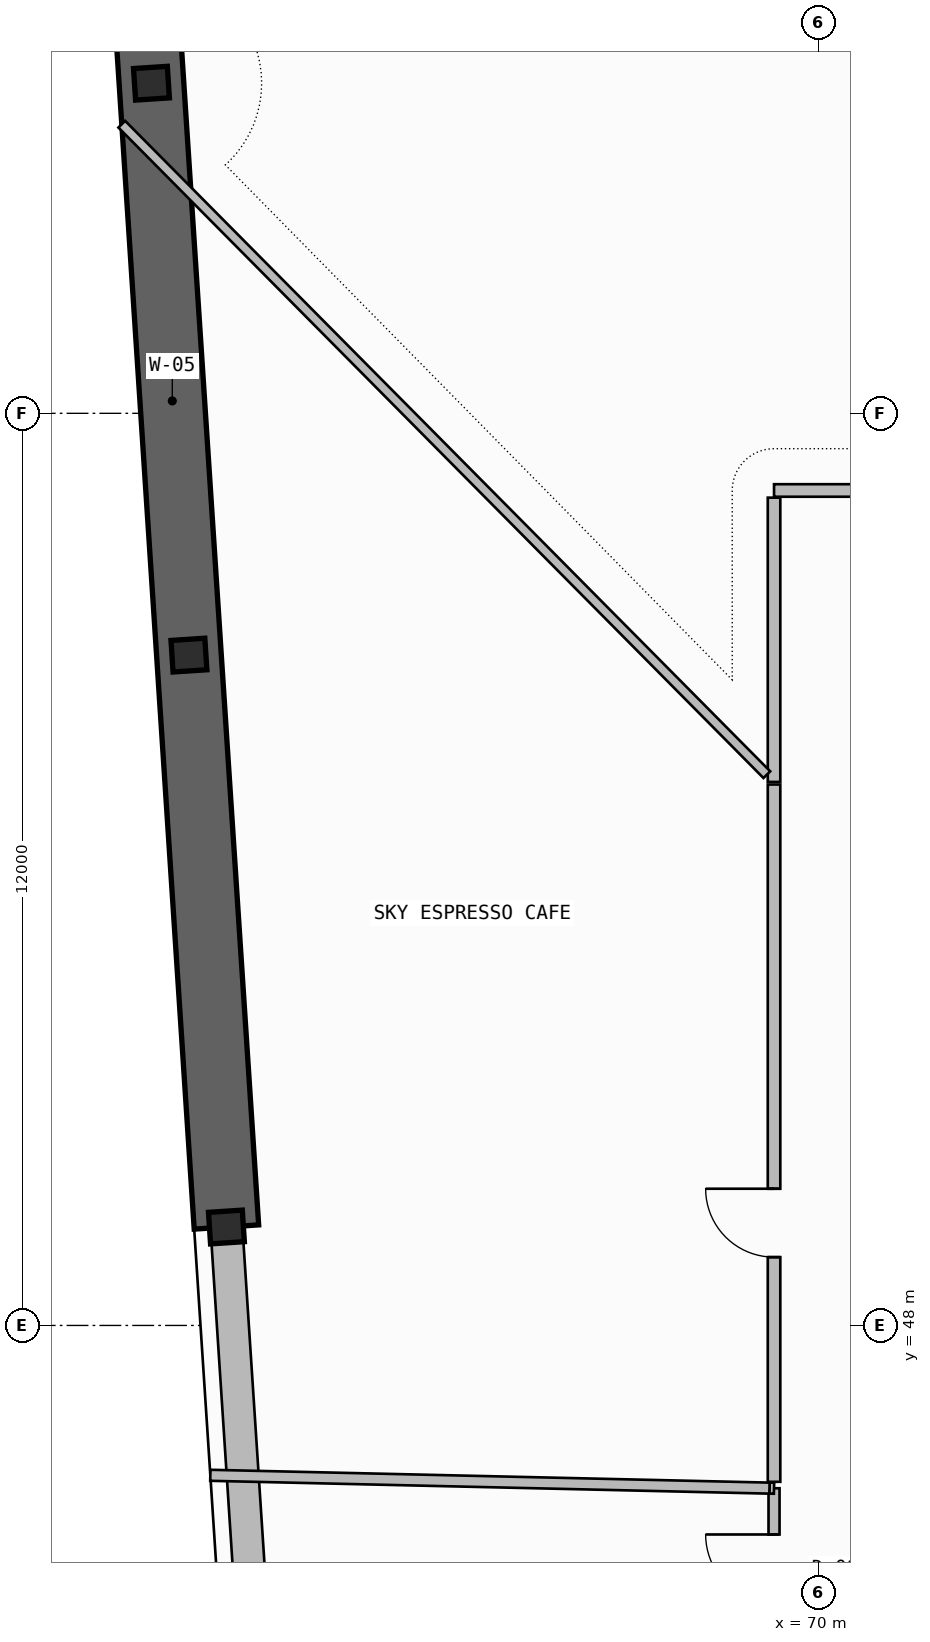
"""IFC4 building model, lengths in metres.
Left out: names, types, materials, properties, quantities, classifications, styles, units other than length and angle.
Written with IfcOpenShell. Run it as: python <this file> out.ifc"""

import sys

from ifc_helpers import new_model, si_unit, direction, frame, frame_2d, origin, origin_2d, place, context, subcontext, project, spatial, rectangle, i_section, extrude, element, fill, save


model = new_model("IFC4")
c1 = context("Model", 3, precision=1e-05, world=origin(), true_north=direction((0.0, 1.0)))
c2 = subcontext(c1, "Body", "Model", "MODEL_VIEW")
j1 = project(units=[si_unit("LENGTHUNIT", "METRE"), si_unit("PLANEANGLEUNIT", "RADIAN")], contexts=[c1])
p1 = place(None, origin())
s1 = spatial("IfcSite", under=j1, at=p1, CompositionType="ELEMENT")
p2 = place(p1, origin())
s2 = spatial("IfcBuilding", under=s1, at=p2, CompositionType="ELEMENT")
p3 = place(p2, frame((0.0, 0.0, 92.1)))
s3 = spatial("IfcBuildingStorey", under=s2, at=p3, CompositionType="ELEMENT", Elevation=92.1)
for number, where, z_axis, x_axis in (
    (1, (61.224, 64.343, 0.0), (0.0, 0.0, 1.0), (-0.065, 0.998, 0.0)),
    (2, (61.717, 56.819, 0.0), (0.0, 0.0, 1.0), (-0.065, 0.998, 0.0)),
    (3, (62.21, 49.295, 0.0), (0.0, 0.0, 1.0), (-0.065, 0.998, 0.0)),
):
    element("IfcColumn", number, at=place(p3, frame(where, z_axis=z_axis, x_axis=x_axis)), inside=s3, PredefinedType="COLUMN", context=c2, shape_type="SweptSolid", body=[
        extrude(i_section(OverallWidth=0.416, OverallDepth=0.446, WebThickness=0.039, FlangeThickness=0.063, FilletRadius=0.015, at=origin_2d()), origin(), (0.0, 0.0, 1.0), 3.6),
    ])
p4 = place(p3, frame((60.785, 71.031, -0.26), z_axis=(0.0, 0.0, 1.0), x_axis=(0.065409824833, -0.997858484363, 0.0)))
e4 = element("IfcWall", 4, at=p4, inside=s3, PredefinedType="SHEAR", context=c2, shape_type="SweptSolid", body=[
    extrude(rectangle(XDim=21.783, YDim=0.85, at=frame_2d((10.891, 0.0))), origin(), (0.0, 0.0, 1.0), 3.46),
])
p5 = place(p3, frame((62.21, 49.295, 0.0), z_axis=(0.0, 0.0, 1.0), x_axis=(0.065396027757, -0.997859388668, 0.0)))
e5 = element("IfcWall", 5, at=p5, inside=s3, PredefinedType="SOLIDWALL", context=c2, shape_type="SweptSolid", body=[
    extrude(rectangle(XDim=14.242, YDim=0.42, at=frame_2d((7.121, 0.0))), origin(), (0.0, 0.0, 1.0), 2.177),
])
p6 = place(p5, frame((7.1, 0.0, 1.197)))
e6 = element("IfcOpeningElement", 6, at=p6, cuts=e5, PredefinedType="OPENING", context=c2, shape_type="SweptSolid", body=[
    extrude(rectangle(XDim=3.0, YDim=0.9, at=frame_2d((1.5, 0.45))), frame((0.0, 0.22, 0.0), z_axis=(0.0, -1.0, 0.0), x_axis=(1.0, 0.0, 0.0)), (0.0, 0.0, 1.0), 0.44),
])
p7 = place(p3, frame((93.176, 59.939, 0.0), z_axis=(0.0, 0.0, 1.0), x_axis=(-0.842412534527, 0.53883311115, 0.0)))
e7 = element("IfcWall", 7, at=p7, inside=s3, PredefinedType="PARAPET", context=c2, shape_type="SweptSolid", body=[
    extrude(rectangle(XDim=35.964, YDim=0.2, at=frame_2d((17.982, 0.0))), origin(), (0.0, 0.0, 1.0), 1.15),
])
p8 = place(p3, frame((69.415, 45.858, 0.0), z_axis=(0.0, 0.0, 1.0), x_axis=(0.0, -1.0, 0.0)))
e8 = element("IfcWall", 8, at=p8, inside=s3, PredefinedType="PARTITIONING", context=c2, shape_type="SweptSolid", body=[
    extrude(rectangle(XDim=2.117, YDim=0.145, at=frame_2d((1.059, 0.0))), origin(), (0.0, 0.0, 1.0), 3.2),
])
p9 = place(p8, frame((0.608, 0.0, 0.0)))
e9 = element("IfcOpeningElement", 9, at=p9, cuts=e8, PredefinedType="OPENING", context=c2, shape_type="SweptSolid", body=[
    extrude(rectangle(XDim=0.9, YDim=2.1, at=frame_2d((0.45, 1.05))), frame((0.0, 0.083, 0.0), z_axis=(0.0, -1.0, 0.0), x_axis=(1.0, 0.0, 0.0)), (0.0, 0.0, 1.0), 0.165),
])
p10 = place(p3, frame((69.355, 45.86, 0.0), z_axis=(0.0, 0.0, 1.0), x_axis=(0.999595394082, -0.028443771376, 0.0)))
e10 = element("IfcWall", 10, at=p10, inside=s3, PredefinedType="PARTITIONING", context=c2, shape_type="SweptSolid", body=[
    extrude(rectangle(XDim=0.06, YDim=0.145, at=frame_2d((0.03, 0.0))), origin(), (0.0, 0.0, 1.0), 3.2),
])
p11 = place(p3, frame((61.998, 46.029, 0.0), z_axis=(0.0, 0.0, 1.0), x_axis=(0.999736411954, -0.022958802544, 0.0)))
e11 = element("IfcWall", 11, at=p11, inside=s3, PredefinedType="PARTITIONING", context=c2, shape_type="SweptSolid", body=[
    extrude(rectangle(XDim=7.359, YDim=0.145, at=frame_2d((3.679, 0.0))), origin(), (0.0, 0.0, 1.0), 3.2),
])
p12 = place(p3, frame((78.613, 58.985, 0.0), z_axis=(0.0, 0.0, 1.0), x_axis=(-1.0, 0.0, 0.0)))
e12 = element("IfcWall", 12, at=p12, inside=s3, PredefinedType="PARTITIONING", context=c2, shape_type="SweptSolid", body=[
    extrude(rectangle(XDim=9.198, YDim=0.165, at=frame_2d((4.599, 0.0))), origin(), (0.0, 0.0, 1.0), 3.2),
])
p13 = place(p12, frame((2.929, 0.0, 0.0)))
e13 = element("IfcOpeningElement", 13, at=p13, cuts=e12, PredefinedType="OPENING", context=c2, shape_type="SweptSolid", body=[
    extrude(rectangle(XDim=1.0, YDim=2.2, at=frame_2d((0.5, 1.1))), frame((0.0, 0.093, 0.0), z_axis=(0.0, -1.0, 0.0), x_axis=(1.0, 0.0, 0.0)), (0.0, 0.0, 1.0), 0.185),
])
p14 = place(p3, frame((69.415, 58.89, 0.0), z_axis=(0.0, 0.0, 1.0), x_axis=(0.0, -1.0, 0.0)))
e14 = element("IfcWall", 14, at=p14, inside=s3, PredefinedType="PARTITIONING", context=c2, shape_type="SweptSolid", body=[
    extrude(rectangle(XDim=3.74, YDim=0.165, at=frame_2d((1.87, 0.0))), origin(), (0.0, 0.0, 1.0), 2.177),
])
p15 = place(p3, frame((69.321, 55.246, 0.0), z_axis=(0.0, 0.0, 1.0), x_axis=(-0.704183883147, 0.710017646763, 0.0)))
e15 = element("IfcWall", 15, at=p15, inside=s3, PredefinedType="PARTITIONING", context=c2, shape_type="SweptSolid", body=[
    extrude(rectangle(XDim=12.053, YDim=0.125, at=frame_2d((6.026, 0.0))), origin(), (0.0, 0.0, 1.0), 2.177),
])
p16 = place(p3, frame((69.415, 55.116, 0.0), z_axis=(0.0, 0.0, 1.0), x_axis=(0.0, -1.0, 0.0)))
e16 = element("IfcWall", 16, at=p16, inside=s3, PredefinedType="PARTITIONING", context=c2, shape_type="SweptSolid", body=[
    extrude(rectangle(XDim=9.174, YDim=0.165, at=frame_2d((4.587, 0.0))), origin(), (0.0, 0.0, 1.0), 2.177),
])
p17 = place(p16, frame((5.318, 0.0, 0.0)))
e17 = element("IfcOpeningElement", 17, at=p17, cuts=e16, PredefinedType="OPENING", context=c2, shape_type="SweptSolid", body=[
    extrude(rectangle(XDim=0.9, YDim=2.1, at=frame_2d((0.45, 1.05))), frame((0.0, 0.093, 0.0), z_axis=(0.0, -1.0, 0.0), x_axis=(1.0, 0.0, 0.0)), (0.0, 0.0, 1.0), 0.185),
])
p18 = place(p9, frame((0.9, 0.0, 0.0), z_axis=(0.0, 0.0, 1.0), x_axis=(-1.0, 0.0, 0.0)))
e18 = element("IfcDoor", 18, at=p18, inside=s3, OperationType="SINGLE_SWING_RIGHT", PredefinedType="DOOR", context=c2, shape_type="SweptSolid", body=[
    extrude(rectangle(XDim=0.9, YDim=2.1, at=frame_2d((0.45, 1.05))), frame((0.0, 0.025, 0.0), z_axis=(0.0, -1.0, 0.0), x_axis=(1.0, 0.0, 0.0)), (0.0, 0.0, 1.0), 0.05),
])
fill(e9, e18)
p19 = place(p17, frame((0.9, 0.0, 0.0), z_axis=(0.0, 0.0, 1.0), x_axis=(-1.0, 0.0, 0.0)))
e19 = element("IfcDoor", 19, at=p19, inside=s3, OperationType="SINGLE_SWING_RIGHT", PredefinedType="DOOR", context=c2, shape_type="SweptSolid", body=[
    extrude(rectangle(XDim=0.9, YDim=2.1, at=frame_2d((0.45, 1.05))), frame((0.0, 0.025, 0.0), z_axis=(0.0, -1.0, 0.0), x_axis=(1.0, 0.0, 0.0)), (0.0, 0.0, 1.0), 0.05),
])
fill(e17, e19)
save(model, sys.argv[1])
